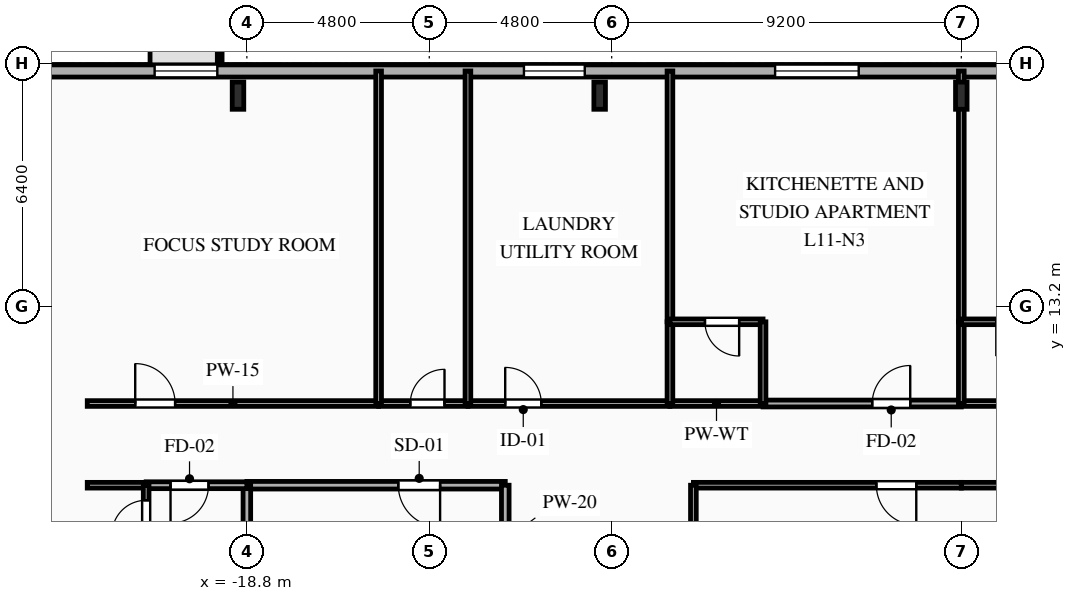
"""IFC4 building model, lengths in metres.
Left out: names, types, materials, properties, quantities, classifications, styles, units other than length and angle.
Written with IfcOpenShell. Run it as: python <this file> out.ifc"""

import sys

from ifc_helpers import new_model, si_unit, direction, frame, frame_2d, origin, origin_2d, place, context, subcontext, project, spatial, rectangle, i_section, extrude, element, fill, save


model = new_model("IFC4")
c1 = context("Model", 3, precision=1e-05, world=origin(), true_north=direction((0.0, 1.0)))
c2 = subcontext(c1, "Body", "Model", "MODEL_VIEW")
j1 = project(units=[si_unit("LENGTHUNIT", "METRE"), si_unit("PLANEANGLEUNIT", "RADIAN")], contexts=[c1])
p1 = place(None, origin())
s1 = spatial("IfcSite", under=j1, at=p1, CompositionType="ELEMENT")
p2 = place(p1, origin())
s2 = spatial("IfcBuilding", under=s1, at=p2, CompositionType="ELEMENT")
p3 = place(p2, frame((0.0, 0.0, 43.75)))
s3 = spatial("IfcBuildingStorey", under=s2, at=p3, CompositionType="ELEMENT", Elevation=43.75)
for number, where, z_axis, x_axis in (
    (1, (0.0, 18.75, 0.0), (0.0, 0.0, 1.0), (1.0, 0.0, 0.0)),
    (2, (-9.517, 18.75, 0.0), (0.0, 0.0, 1.0), (1.0, 0.0, 0.0)),
    (3, (-19.033, 18.75, 0.0), (0.0, 0.0, 1.0), (1.0, 0.0, 0.0)),
):
    element("IfcColumn", number, at=place(p3, frame(where, z_axis=z_axis, x_axis=x_axis)), inside=s3, PredefinedType="COLUMN", context=c2, shape_type="SweptSolid", body=[
        extrude(i_section(OverallWidth=0.304, OverallDepth=0.716, WebThickness=0.021, FlangeThickness=0.04, FilletRadius=0.027, at=origin_2d()), origin(), (0.0, 0.0, 1.0), 3.35),
    ])
p4 = place(p3, frame((-29.2, 19.4, 0.0), z_axis=(0.0, 0.0, 1.0), x_axis=(1.0, 0.0, 0.0)))
e4 = element("IfcWall", 4, at=p4, inside=s3, PredefinedType="SOLIDWALL", context=c2, shape_type="SweptSolid", body=[
    extrude(rectangle(XDim=58.4, YDim=0.32, at=frame_2d((29.2, 0.0))), origin(), (0.0, 0.0, 1.0), 3.035),
])
p5 = place(p4, frame((7.972, 0.0, 0.85)))
e5 = element("IfcOpeningElement", 5, at=p5, cuts=e4, PredefinedType="OPENING", context=c2, shape_type="SweptSolid", body=[
    extrude(rectangle(XDim=1.65, YDim=1.85, at=frame_2d((0.825, 0.925))), frame((0.0, 0.17, 0.0), z_axis=(0.0, -1.0, 0.0), x_axis=(1.0, 0.0, 0.0)), (0.0, 0.0, 1.0), 0.34),
])
p6 = place(p4, frame((17.691, 0.0, 0.85)))
e6 = element("IfcOpeningElement", 6, at=p6, cuts=e4, PredefinedType="OPENING", context=c2, shape_type="SweptSolid", body=[
    extrude(rectangle(XDim=1.6, YDim=1.85, at=frame_2d((0.8, 0.925))), frame((0.0, 0.17, 0.0), z_axis=(0.0, -1.0, 0.0), x_axis=(1.0, 0.0, 0.0)), (0.0, 0.0, 1.0), 0.34),
])
p7 = place(p4, frame((24.3, 0.0, 0.85)))
e7 = element("IfcOpeningElement", 7, at=p7, cuts=e4, PredefinedType="OPENING", context=c2, shape_type="SweptSolid", body=[
    extrude(rectangle(XDim=2.2, YDim=1.85, at=frame_2d((1.1, 0.925))), frame((0.0, 0.17, 0.0), z_axis=(0.0, -1.0, 0.0), x_axis=(1.0, 0.0, 0.0)), (0.0, 0.0, 1.0), 0.34),
])
p8 = place(p4, frame((31.98, 0.0, 0.85)))
e8 = element("IfcOpeningElement", 8, at=p8, cuts=e4, PredefinedType="OPENING", context=c2, shape_type="SweptSolid", body=[
    extrude(rectangle(XDim=2.2, YDim=1.85, at=frame_2d((1.1, 0.925))), frame((0.0, 0.17, 0.0), z_axis=(0.0, -1.0, 0.0), x_axis=(1.0, 0.0, 0.0)), (0.0, 0.0, 1.0), 0.34),
])
p9 = place(p4, frame((39.62, 0.0, 0.85)))
e9 = element("IfcOpeningElement", 9, at=p9, cuts=e4, PredefinedType="OPENING", context=c2, shape_type="SweptSolid", body=[
    extrude(rectangle(XDim=2.2, YDim=1.85, at=frame_2d((1.1, 0.925))), frame((0.0, 0.17, 0.0), z_axis=(0.0, -1.0, 0.0), x_axis=(1.0, 0.0, 0.0)), (0.0, 0.0, 1.0), 0.34),
])
p10 = place(p4, frame((46.292, 0.0, 0.85)))
e10 = element("IfcOpeningElement", 10, at=p10, cuts=e4, PredefinedType="OPENING", context=c2, shape_type="SweptSolid", body=[
    extrude(rectangle(XDim=1.65, YDim=1.85, at=frame_2d((0.825, 0.925))), frame((0.0, 0.17, 0.0), z_axis=(0.0, -1.0, 0.0), x_axis=(1.0, 0.0, 0.0)), (0.0, 0.0, 1.0), 0.34),
])
p11 = place(p3, frame((-12.0, 8.5, 0.0), z_axis=(0.0, 0.0, 1.0), x_axis=(-1.0, 0.0, 0.0)))
e11 = element("IfcWall", 11, at=p11, inside=s3, PredefinedType="PARTITIONING", context=c2, shape_type="SweptSolid", body=[
    extrude(rectangle(XDim=6.8, YDim=0.2, at=frame_2d((3.4, 0.0))), origin(), (0.0, 0.0, 1.0), 3.035),
])
p12 = place(p11, frame((1.715, 0.0, 0.0)))
e12 = element("IfcOpeningElement", 12, at=p12, cuts=e11, PredefinedType="OPENING", context=c2, shape_type="SweptSolid", body=[
    extrude(rectangle(XDim=1.1, YDim=2.15, at=frame_2d((0.55, 1.075))), frame((0.0, 0.11, 0.0), z_axis=(0.0, -1.0, 0.0), x_axis=(1.0, 0.0, 0.0)), (0.0, 0.0, 1.0), 0.22),
])
p13 = place(p3, frame((-12.0, 5.6, 0.0), z_axis=(0.0, 0.0, 1.0), x_axis=(0.0, 1.0, 0.0)))
e13 = element("IfcWall", 13, at=p13, inside=s3, PredefinedType="PARTITIONING", context=c2, shape_type="SweptSolid", body=[
    extrude(rectangle(XDim=2.9, YDim=0.2, at=frame_2d((1.45, 0.0))), origin(), (0.0, 0.0, 1.0), 3.035),
])
p14 = place(p3, frame((-18.8, 8.5, 0.0), z_axis=(0.0, 0.0, 1.0), x_axis=(0.0, -1.0, 0.0)))
e14 = element("IfcWall", 14, at=p14, inside=s3, PredefinedType="PARTITIONING", context=c2, shape_type="SweptSolid", body=[
    extrude(rectangle(XDim=2.9, YDim=0.2, at=frame_2d((1.45, 0.0))), origin(), (0.0, 0.0, 1.0), 2.52),
])
p15 = place(p3, frame((-18.8, 8.5, 0.0), z_axis=(0.0, 0.0, 1.0), x_axis=(-1.0, 0.0, 0.0)))
e15 = element("IfcWall", 15, at=p15, inside=s3, PredefinedType="PARTITIONING", context=c2, shape_type="SweptSolid", body=[
    extrude(rectangle(XDim=2.65, YDim=0.18, at=frame_2d((1.325, 0.0))), origin(), (0.0, 0.0, 1.0), 3.035),
])
p16 = place(p15, frame((1.009, 0.0, 0.0)))
e16 = element("IfcOpeningElement", 16, at=p16, cuts=e15, PredefinedType="OPENING", context=c2, shape_type="SweptSolid", body=[
    extrude(rectangle(XDim=1.0, YDim=2.15, at=frame_2d((0.5, 1.075))), frame((0.0, 0.1, 0.0), z_axis=(0.0, -1.0, 0.0), x_axis=(1.0, 0.0, 0.0)), (0.0, 0.0, 1.0), 0.2),
])
p17 = place(p3, frame((-21.45, 8.5, 0.0), z_axis=(0.0, 0.0, 1.0), x_axis=(-1.0, 0.0, 0.0)))
e17 = element("IfcWall", 17, at=p17, inside=s3, PredefinedType="PARTITIONING", context=c2, shape_type="SweptSolid", body=[
    extrude(rectangle(XDim=1.55, YDim=0.15, at=frame_2d((0.775, 0.0))), origin(), (0.0, 0.0, 1.0), 3.035),
])
p18 = place(p3, frame((-23.0, 10.65, 0.0), z_axis=(0.0, 0.0, 1.0), x_axis=(1.0, 0.0, 0.0)))
e18 = element("IfcWall", 18, at=p18, inside=s3, PredefinedType="PARTITIONING", context=c2, shape_type="SweptSolid", body=[
    extrude(rectangle(XDim=7.667, YDim=0.15, at=frame_2d((3.833, 0.0))), origin(), (0.0, 0.0, 1.0), 3.035),
])
p19 = place(p18, frame((1.262, 0.0, 0.0)))
e19 = element("IfcOpeningElement", 19, at=p19, cuts=e18, PredefinedType="OPENING", context=c2, shape_type="SweptSolid", body=[
    extrude(rectangle(XDim=1.05, YDim=2.15, at=frame_2d((0.525, 1.075))), frame((0.0, 0.085, 0.0), z_axis=(0.0, -1.0, 0.0), x_axis=(1.0, 0.0, 0.0)), (0.0, 0.0, 1.0), 0.17),
])
p20 = place(p3, frame((-15.333, 10.65, 0.0), z_axis=(0.0, 0.0, 1.0), x_axis=(1.0, 0.0, 0.0)))
e20 = element("IfcWall", 20, at=p20, inside=s3, PredefinedType="PLUMBINGWALL", context=c2, shape_type="SweptSolid", body=[
    extrude(rectangle(XDim=2.35, YDim=0.15, at=frame_2d((1.175, 0.0))), origin(), (0.0, 0.0, 1.0), 3.035),
])
p21 = place(p20, frame((0.834, 0.0, 0.0)))
e21 = element("IfcOpeningElement", 21, at=p21, cuts=e20, PredefinedType="OPENING", context=c2, shape_type="SweptSolid", body=[
    extrude(rectangle(XDim=0.9, YDim=2.1, at=frame_2d((0.45, 1.05))), frame((0.0, 0.085, 0.0), z_axis=(0.0, -1.0, 0.0), x_axis=(1.0, 0.0, 0.0)), (0.0, 0.0, 1.0), 0.17),
])
p22 = place(p3, frame((-12.983, 10.65, 0.0), z_axis=(0.0, 0.0, 1.0), x_axis=(1.0, 0.0, 0.0)))
e22 = element("IfcWall", 22, at=p22, inside=s3, PredefinedType="PARTITIONING", context=c2, shape_type="SweptSolid", body=[
    extrude(rectangle(XDim=5.316, YDim=0.15, at=frame_2d((2.658, 0.0))), origin(), (0.0, 0.0, 1.0), 3.035),
])
p23 = place(p22, frame((0.981, 0.0, 0.0)))
e23 = element("IfcOpeningElement", 23, at=p23, cuts=e22, PredefinedType="OPENING", context=c2, shape_type="SweptSolid", body=[
    extrude(rectangle(XDim=0.95, YDim=2.1, at=frame_2d((0.475, 1.05))), frame((0.0, 0.085, 0.0), z_axis=(0.0, -1.0, 0.0), x_axis=(1.0, 0.0, 0.0)), (0.0, 0.0, 1.0), 0.17),
])
p24 = place(p3, frame((-5.217, 10.65, 0.0), z_axis=(0.0, 0.0, 1.0), x_axis=(1.0, 0.0, 0.0)))
e24 = element("IfcWall", 24, at=p24, inside=s3, PredefinedType="PARTITIONING", context=c2, shape_type="SweptSolid", body=[
    extrude(rectangle(XDim=5.217, YDim=0.18, at=frame_2d((2.608, 0.0))), origin(), (0.0, 0.0, 1.0), 3.035),
])
p25 = place(p24, frame((2.873, 0.0, 0.0)))
e25 = element("IfcOpeningElement", 25, at=p25, cuts=e24, PredefinedType="OPENING", context=c2, shape_type="SweptSolid", body=[
    extrude(rectangle(XDim=1.0, YDim=2.15, at=frame_2d((0.5, 1.075))), frame((0.0, 0.1, 0.0), z_axis=(0.0, -1.0, 0.0), x_axis=(1.0, 0.0, 0.0)), (0.0, 0.0, 1.0), 0.2),
])
p26 = place(p3, frame((-7.667, 10.65, 0.0), z_axis=(0.0, 0.0, 1.0), x_axis=(1.0, 0.0, 0.0)))
e26 = element("IfcWall", 26, at=p26, inside=s3, PredefinedType="PLUMBINGWALL", context=c2, shape_type="SweptSolid", body=[
    extrude(rectangle(XDim=2.45, YDim=0.15, at=frame_2d((1.225, 0.0))), origin(), (0.0, 0.0, 1.0), 3.035),
])
p27 = place(p3, frame((0.0, 8.5, 0.0), z_axis=(0.0, 0.0, 1.0), x_axis=(-1.0, 0.0, 0.0)))
e27 = element("IfcWall", 27, at=p27, inside=s3, PredefinedType="PARTITIONING", context=c2, shape_type="SweptSolid", body=[
    extrude(rectangle(XDim=7.05, YDim=0.15, at=frame_2d((3.525, 0.0))), origin(), (0.0, 0.0, 1.0), 3.035),
])
p28 = place(p27, frame((1.185, 0.0, 0.0)))
e28 = element("IfcOpeningElement", 28, at=p28, cuts=e27, PredefinedType="OPENING", context=c2, shape_type="SweptSolid", body=[
    extrude(rectangle(XDim=1.05, YDim=2.15, at=frame_2d((0.525, 1.075))), frame((0.0, 0.085, 0.0), z_axis=(0.0, -1.0, 0.0), x_axis=(1.0, 0.0, 0.0)), (0.0, 0.0, 1.0), 0.17),
])
p29 = place(p3, frame((0.0, 10.65, 0.0), z_axis=(0.0, 0.0, 1.0), x_axis=(1.0, 0.0, 0.0)))
e29 = element("IfcWall", 29, at=p29, inside=s3, PredefinedType="PLUMBINGWALL", context=c2, shape_type="SweptSolid", body=[
    extrude(rectangle(XDim=2.45, YDim=0.15, at=frame_2d((1.225, 0.0))), origin(), (0.0, 0.0, 1.0), 3.035),
])
for number, where, z_axis, x_axis in (
    (30, (7.05, 8.5, 0.0), (0.0, 0.0, 1.0), (-1.0, 0.0, 0.0)),
    (31, (-7.05, 8.5, 0.0), (0.0, 0.0, 1.0), (0.0, -1.0, 0.0)),
):
    element("IfcWall", number, at=place(p3, frame(where, z_axis=z_axis, x_axis=x_axis)), inside=s3, PredefinedType="PARTITIONING", context=c2, shape_type="SweptSolid", body=[
        extrude(rectangle(XDim=7.05, YDim=0.15, at=frame_2d((3.525, 0.0))), origin(), (0.0, 0.0, 1.0), 3.035),
    ])
p30 = place(p3, frame((-21.45, 6.808, 0.0), z_axis=(0.0, 0.0, 1.0), x_axis=(0.0, 1.0, 0.0)))
e32 = element("IfcWall", 32, at=p30, inside=s3, PredefinedType="PARTITIONING", context=c2, shape_type="SweptSolid", body=[
    extrude(rectangle(XDim=1.692, YDim=0.15, at=frame_2d((0.846, 0.0))), origin(), (0.0, 0.0, 1.0), 3.035),
])
p31 = place(p30, frame((0.396, 0.0, 0.0)))
e33 = element("IfcOpeningElement", 33, at=p31, cuts=e32, PredefinedType="OPENING", context=c2, shape_type="SweptSolid", body=[
    extrude(rectangle(XDim=0.9, YDim=2.1, at=frame_2d((0.45, 1.05))), frame((0.0, 0.085, 0.0), z_axis=(0.0, -1.0, 0.0), x_axis=(1.0, 0.0, 0.0)), (0.0, 0.0, 1.0), 0.17),
])
for number, where, z_axis, x_axis in (
    (34, (-15.333, 19.4, 0.0), (0.0, 0.0, 1.0), (0.0, -1.0, 0.0)),
    (35, (-12.983, 19.4, 0.0), (0.0, 0.0, 1.0), (0.0, -1.0, 0.0)),
):
    element("IfcWall", number, at=place(p3, frame(where, z_axis=z_axis, x_axis=x_axis)), inside=s3, PredefinedType="PLUMBINGWALL", context=c2, shape_type="SweptSolid", body=[
        extrude(rectangle(XDim=8.75, YDim=0.15, at=frame_2d((4.375, 0.0))), origin(), (0.0, 0.0, 1.0), 3.035),
    ])
p32 = place(p3, frame((-7.667, 19.4, 0.0), z_axis=(0.0, 0.0, 1.0), x_axis=(0.0, -1.0, 0.0)))
e36 = element("IfcWall", 36, at=p32, inside=s3, PredefinedType="PARTITIONING", context=c2, shape_type="SweptSolid", body=[
    extrude(rectangle(XDim=6.6, YDim=0.15, at=frame_2d((3.3, 0.0))), origin(), (0.0, 0.0, 1.0), 3.035),
])
p33 = place(p3, frame((-7.667, 12.8, 0.0), z_axis=(0.0, 0.0, 1.0), x_axis=(0.0, -1.0, 0.0)))
e37 = element("IfcWall", 37, at=p33, inside=s3, PredefinedType="PLUMBINGWALL", context=c2, shape_type="SweptSolid", body=[
    extrude(rectangle(XDim=2.15, YDim=0.15, at=frame_2d((1.075, 0.0))), origin(), (0.0, 0.0, 1.0), 3.035),
])
p34 = place(p3, frame((-5.217, 12.8, 0.0), z_axis=(0.0, 0.0, 1.0), x_axis=(-1.0, 0.0, 0.0)))
e38 = element("IfcWall", 38, at=p34, inside=s3, PredefinedType="PLUMBINGWALL", context=c2, shape_type="SweptSolid", body=[
    extrude(rectangle(XDim=2.45, YDim=0.15, at=frame_2d((1.225, 0.0))), origin(), (0.0, 0.0, 1.0), 3.035),
])
p35 = place(p34, frame((0.629, 0.0, 0.0)))
e39 = element("IfcOpeningElement", 39, at=p35, cuts=e38, PredefinedType="OPENING", context=c2, shape_type="SweptSolid", body=[
    extrude(rectangle(XDim=0.9, YDim=2.1, at=frame_2d((0.45, 1.05))), frame((0.0, 0.085, 0.0), z_axis=(0.0, -1.0, 0.0), x_axis=(1.0, 0.0, 0.0)), (0.0, 0.0, 1.0), 0.17),
])
p36 = place(p3, frame((-5.217, 10.65, 0.0), z_axis=(0.0, 0.0, 1.0), x_axis=(0.0, 1.0, 0.0)))
e40 = element("IfcWall", 40, at=p36, inside=s3, PredefinedType="PLUMBINGWALL", context=c2, shape_type="SweptSolid", body=[
    extrude(rectangle(XDim=2.15, YDim=0.15, at=frame_2d((1.075, 0.0))), origin(), (0.0, 0.0, 1.0), 3.035),
])
p37 = place(p3, frame((0.0, 19.4, 0.0), z_axis=(0.0, 0.0, 1.0), x_axis=(0.0, -1.0, 0.0)))
e41 = element("IfcWall", 41, at=p37, inside=s3, PredefinedType="PARTITIONING", context=c2, shape_type="SweptSolid", body=[
    extrude(rectangle(XDim=6.6, YDim=0.15, at=frame_2d((3.3, 0.0))), origin(), (0.0, 0.0, 1.0), 3.035),
])
p38 = place(p3, frame((0.0, 12.8, 0.0), z_axis=(0.0, 0.0, 1.0), x_axis=(0.0, -1.0, 0.0)))
e42 = element("IfcWall", 42, at=p38, inside=s3, PredefinedType="PLUMBINGWALL", context=c2, shape_type="SweptSolid", body=[
    extrude(rectangle(XDim=2.15, YDim=0.15, at=frame_2d((1.075, 0.0))), origin(), (0.0, 0.0, 1.0), 3.035),
])
p39 = place(p3, frame((2.45, 12.8, 0.0), z_axis=(0.0, 0.0, 1.0), x_axis=(-1.0, 0.0, 0.0)))
e43 = element("IfcWall", 43, at=p39, inside=s3, PredefinedType="PLUMBINGWALL", context=c2, shape_type="SweptSolid", body=[
    extrude(rectangle(XDim=2.45, YDim=0.15, at=frame_2d((1.225, 0.0))), origin(), (0.0, 0.0, 1.0), 3.035),
])
p40 = place(p39, frame((0.629, 0.0, 0.0)))
e44 = element("IfcOpeningElement", 44, at=p40, cuts=e43, PredefinedType="OPENING", context=c2, shape_type="SweptSolid", body=[
    extrude(rectangle(XDim=0.9, YDim=2.1, at=frame_2d((0.45, 1.05))), frame((0.0, 0.085, 0.0), z_axis=(0.0, -1.0, 0.0), x_axis=(1.0, 0.0, 0.0)), (0.0, 0.0, 1.0), 0.17),
])
p41 = place(p5, origin())
e45 = element("IfcWindow", 45, at=p41, inside=s3, PartitioningType="SINGLE_PANEL", PredefinedType="WINDOW", context=c2, shape_type="SweptSolid", body=[
    extrude(rectangle(XDim=1.65, YDim=1.85, at=frame_2d((0.825, 0.925))), frame((0.0, 0.03, 0.0), z_axis=(0.0, -1.0, 0.0), x_axis=(1.0, 0.0, 0.0)), (0.0, 0.0, 1.0), 0.06),
])
fill(e5, e45)
p42 = place(p6, origin())
e46 = element("IfcWindow", 46, at=p42, inside=s3, PartitioningType="SINGLE_PANEL", PredefinedType="WINDOW", context=c2, shape_type="SweptSolid", body=[
    extrude(rectangle(XDim=1.6, YDim=1.85, at=frame_2d((0.8, 0.925))), frame((0.0, 0.03, 0.0), z_axis=(0.0, -1.0, 0.0), x_axis=(1.0, 0.0, 0.0)), (0.0, 0.0, 1.0), 0.06),
])
fill(e6, e46)
p43 = place(p7, origin())
e47 = element("IfcWindow", 47, at=p43, inside=s3, PartitioningType="SINGLE_PANEL", PredefinedType="WINDOW", context=c2, shape_type="SweptSolid", body=[
    extrude(rectangle(XDim=2.2, YDim=1.85, at=frame_2d((1.1, 0.925))), frame((0.0, 0.03, 0.0), z_axis=(0.0, -1.0, 0.0), x_axis=(1.0, 0.0, 0.0)), (0.0, 0.0, 1.0), 0.06),
])
fill(e7, e47)
p44 = place(p12, origin())
e48 = element("IfcDoor", 48, at=p44, inside=s3, OperationType="SINGLE_SWING_LEFT", PredefinedType="DOOR", context=c2, shape_type="SweptSolid", body=[
    extrude(rectangle(XDim=1.1, YDim=2.15, at=frame_2d((0.55, 1.075))), frame((0.0, 0.025, 0.0), z_axis=(0.0, -1.0, 0.0), x_axis=(1.0, 0.0, 0.0)), (0.0, 0.0, 1.0), 0.05),
])
fill(e12, e48)
p45 = place(p16, origin())
e49 = element("IfcDoor", 49, at=p45, inside=s3, OperationType="SINGLE_SWING_RIGHT", PredefinedType="DOOR", context=c2, shape_type="SweptSolid", body=[
    extrude(rectangle(XDim=1.0, YDim=2.15, at=frame_2d((0.5, 1.075))), frame((0.0, 0.025, 0.0), z_axis=(0.0, -1.0, 0.0), x_axis=(1.0, 0.0, 0.0)), (0.0, 0.0, 1.0), 0.05),
])
fill(e16, e49)
p46 = place(p19, origin())
e50 = element("IfcDoor", 50, at=p46, inside=s3, OperationType="SINGLE_SWING_LEFT", PredefinedType="DOOR", context=c2, shape_type="SweptSolid", body=[
    extrude(rectangle(XDim=1.05, YDim=2.15, at=frame_2d((0.525, 1.075))), frame((0.0, 0.025, 0.0), z_axis=(0.0, -1.0, 0.0), x_axis=(1.0, 0.0, 0.0)), (0.0, 0.0, 1.0), 0.05),
])
fill(e19, e50)
p47 = place(p21, origin())
e51 = element("IfcDoor", 51, at=p47, inside=s3, OperationType="SINGLE_SWING_RIGHT", PredefinedType="DOOR", context=c2, shape_type="SweptSolid", body=[
    extrude(rectangle(XDim=0.9, YDim=2.1, at=frame_2d((0.45, 1.05))), frame((0.0, 0.025, 0.0), z_axis=(0.0, -1.0, 0.0), x_axis=(1.0, 0.0, 0.0)), (0.0, 0.0, 1.0), 0.05),
])
fill(e21, e51)
p48 = place(p23, origin())
e52 = element("IfcDoor", 52, at=p48, inside=s3, OperationType="SINGLE_SWING_LEFT", PredefinedType="DOOR", context=c2, shape_type="SweptSolid", body=[
    extrude(rectangle(XDim=0.95, YDim=2.1, at=frame_2d((0.475, 1.05))), frame((0.0, 0.025, 0.0), z_axis=(0.0, -1.0, 0.0), x_axis=(1.0, 0.0, 0.0)), (0.0, 0.0, 1.0), 0.05),
])
fill(e23, e52)
p49 = place(p25, origin())
e53 = element("IfcDoor", 53, at=p49, inside=s3, OperationType="SINGLE_SWING_RIGHT", PredefinedType="DOOR", context=c2, shape_type="SweptSolid", body=[
    extrude(rectangle(XDim=1.0, YDim=2.15, at=frame_2d((0.5, 1.075))), frame((0.0, 0.025, 0.0), z_axis=(0.0, -1.0, 0.0), x_axis=(1.0, 0.0, 0.0)), (0.0, 0.0, 1.0), 0.05),
])
fill(e25, e53)
p50 = place(p28, origin())
e54 = element("IfcDoor", 54, at=p50, inside=s3, OperationType="SINGLE_SWING_LEFT", PredefinedType="DOOR", context=c2, shape_type="SweptSolid", body=[
    extrude(rectangle(XDim=1.05, YDim=2.15, at=frame_2d((0.525, 1.075))), frame((0.0, 0.025, 0.0), z_axis=(0.0, -1.0, 0.0), x_axis=(1.0, 0.0, 0.0)), (0.0, 0.0, 1.0), 0.05),
])
fill(e28, e54)
p51 = place(p31, origin())
e55 = element("IfcDoor", 55, at=p51, inside=s3, OperationType="SINGLE_SWING_LEFT", PredefinedType="DOOR", context=c2, shape_type="SweptSolid", body=[
    extrude(rectangle(XDim=0.9, YDim=2.1, at=frame_2d((0.45, 1.05))), frame((0.0, 0.025, 0.0), z_axis=(0.0, -1.0, 0.0), x_axis=(1.0, 0.0, 0.0)), (0.0, 0.0, 1.0), 0.05),
])
fill(e33, e55)
p52 = place(p35, origin())
e56 = element("IfcDoor", 56, at=p52, inside=s3, OperationType="SINGLE_SWING_LEFT", PredefinedType="DOOR", context=c2, shape_type="SweptSolid", body=[
    extrude(rectangle(XDim=0.9, YDim=2.1, at=frame_2d((0.45, 1.05))), frame((0.0, 0.025, 0.0), z_axis=(0.0, -1.0, 0.0), x_axis=(1.0, 0.0, 0.0)), (0.0, 0.0, 1.0), 0.05),
])
fill(e39, e56)
p53 = place(p40, origin())
e57 = element("IfcDoor", 57, at=p53, inside=s3, OperationType="SINGLE_SWING_RIGHT", PredefinedType="DOOR", context=c2, shape_type="SweptSolid", body=[
    extrude(rectangle(XDim=0.9, YDim=2.1, at=frame_2d((0.45, 1.05))), frame((0.0, 0.025, 0.0), z_axis=(0.0, -1.0, 0.0), x_axis=(1.0, 0.0, 0.0)), (0.0, 0.0, 1.0), 0.05),
])
fill(e44, e57)
save(model, sys.argv[1])
